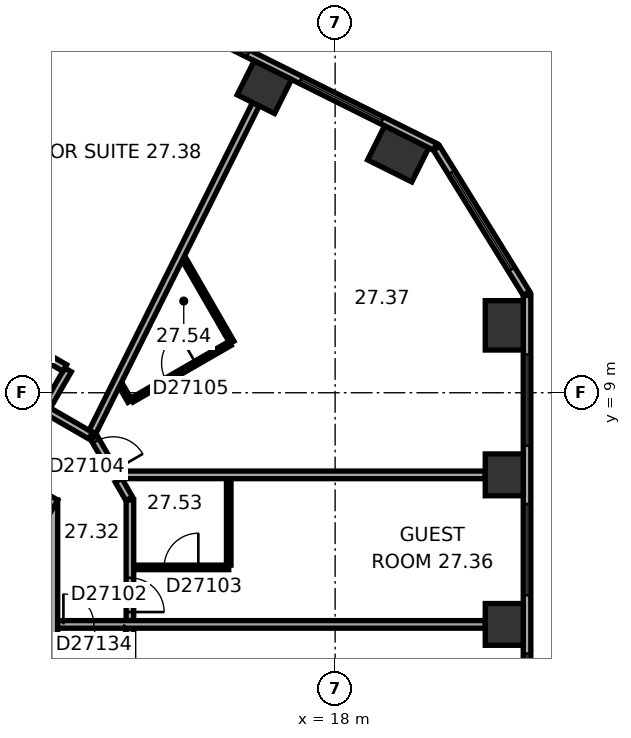
"""IFC4 building model, lengths in metres.
Left out: names, types, materials, properties, quantities, classifications, styles, units other than length and angle.
Written with IfcOpenShell. Run it as: python <this file> out.ifc"""

import sys

from ifc_helpers import new_model, si_unit, direction, frame, frame_2d, origin, origin_2d, place, context, subcontext, project, spatial, rectangle, extrude, element, fill, save


model = new_model("IFC4")
c1 = context("Model", 3, precision=1e-05, world=origin(), true_north=direction((0.0, 1.0)))
c2 = subcontext(c1, "Body", "Model", "MODEL_VIEW")
j1 = project(units=[si_unit("LENGTHUNIT", "METRE"), si_unit("PLANEANGLEUNIT", "RADIAN")], contexts=[c1])
p1 = place(None, origin())
s1 = spatial("IfcSite", under=j1, at=p1, CompositionType="ELEMENT")
p2 = place(p1, origin())
s2 = spatial("IfcBuilding", under=s1, at=p2, CompositionType="ELEMENT")
p3 = place(p2, frame((0.0, 0.0, 113.3)))
s3 = spatial("IfcBuildingStorey", under=s2, at=p3, CompositionType="ELEMENT", Elevation=113.3)
for number, where, z_axis, x_axis in (
    (1, (22.45, 2.905, 0.0), (0.0, 0.0, 1.0), (0.0, 1.0, 0.0)),
    (2, (22.45, 6.839, 0.0), (0.0, 0.0, 1.0), (0.0, 1.0, 0.0)),
):
    element("IfcColumn", number, at=place(p3, frame(where, z_axis=z_axis, x_axis=x_axis)), inside=s3, PredefinedType="COLUMN", context=c2, shape_type="SweptSolid", body=[
        extrude(rectangle(XDim=1.1, YDim=1.0, at=origin_2d()), origin(), (0.0, 0.0, 1.0), 3.3),
    ])
for number, where, z_axis, x_axis in (
    (3, (22.45, 10.774, 0.0), (0.0, 0.0, 1.0), (0.0, 1.0, 0.0)),
    (4, (19.659, 15.284, 0.0), (0.0, 0.0, 1.0), (-0.895, 0.446, 0.0)),
):
    element("IfcColumn", number, at=place(p3, frame(where, z_axis=z_axis, x_axis=x_axis)), inside=s3, PredefinedType="COLUMN", context=c2, shape_type="SweptSolid", body=[
        extrude(rectangle(XDim=1.3, YDim=1.0, at=origin_2d()), origin(), (0.0, 0.0, 1.0), 3.3),
    ])
p4 = place(p3, frame((16.138, 17.04, 0.0), z_axis=(0.0, 0.0, 1.0), x_axis=(-0.894934361602, 0.44619781311, 0.0)))
e5 = element("IfcColumn", 5, at=p4, inside=s3, PredefinedType="COLUMN", context=c2, shape_type="SweptSolid", body=[
    extrude(rectangle(XDim=1.1, YDim=1.0, at=origin_2d()), origin(), (0.0, 0.0, 1.0), 3.3),
])
p5 = place(p3, frame((10.1, -6.177, 0.0), z_axis=(0.0, 0.0, 1.0), x_axis=(0.0, 1.0, 0.0)))
e6 = element("IfcWall", 6, at=p5, inside=s3, PredefinedType="SHEAR", context=c2, shape_type="SweptSolid", body=[
    extrude(rectangle(XDim=12.355, YDim=1.2, at=frame_2d((6.177, 0.0))), origin(), (0.0, 0.0, 1.0), 3.3),
])
p6 = place(p5, frame((6.378, 0.0, 0.0)))
e7 = element("IfcOpeningElement", 7, at=p6, cuts=e6, PredefinedType="OPENING", context=c2, shape_type="SweptSolid", body=[
    extrude(rectangle(XDim=1.5, YDim=2.1, at=frame_2d((0.75, 1.05))), frame((0.0, 0.61, 0.0), z_axis=(0.0, -1.0, 0.0), x_axis=(1.0, 0.0, 0.0)), (0.0, 0.0, 1.0), 1.22),
])
p7 = place(p5, frame((1.828, 0.0, 0.0)))
e8 = element("IfcOpeningElement", 8, at=p7, cuts=e6, PredefinedType="OPENING", context=c2, shape_type="SweptSolid", body=[
    extrude(rectangle(XDim=1.1, YDim=2.1, at=frame_2d((0.55, 1.05))), frame((0.0, 0.61, 0.0), z_axis=(0.0, -1.0, 0.0), x_axis=(1.0, 0.0, 0.0)), (0.0, 0.0, 1.0), 1.22),
])
p8 = place(p5, frame((4.427, 0.0, 0.0)))
e9 = element("IfcOpeningElement", 9, at=p8, cuts=e6, PredefinedType="OPENING", context=c2, shape_type="SweptSolid", body=[
    extrude(rectangle(XDim=1.1, YDim=2.1, at=frame_2d((0.55, 1.05))), frame((0.0, 0.61, 0.0), z_axis=(0.0, -1.0, 0.0), x_axis=(1.0, 0.0, 0.0)), (0.0, 0.0, 1.0), 1.22),
])
p9 = place(p3, frame((10.4, 5.658, 0.0), z_axis=(0.0, 0.0, 1.0), x_axis=(-0.866021384402, 0.500006961711, 0.0)))
e10 = element("IfcWall", 10, at=p9, inside=s3, PredefinedType="SHEAR", context=c2, shape_type="SweptSolid", body=[
    extrude(rectangle(XDim=12.355, YDim=1.2, at=frame_2d((6.178, 0.0))), origin(), (0.0, 0.0, 1.0), 3.3),
])
p10 = place(p9, frame((2.728, 0.0, 0.0)))
e11 = element("IfcOpeningElement", 11, at=p10, cuts=e10, PredefinedType="OPENING", context=c2, shape_type="SweptSolid", body=[
    extrude(rectangle(XDim=1.1, YDim=2.1, at=frame_2d((0.55, 1.05))), frame((0.0, 0.61, 0.0), z_axis=(0.0, -1.0, 0.0), x_axis=(1.0, 0.0, 0.0)), (0.0, 0.0, 1.0), 1.22),
])
p11 = place(p9, frame((5.328, 0.0, 0.0)))
e12 = element("IfcOpeningElement", 12, at=p11, cuts=e10, PredefinedType="OPENING", context=c2, shape_type="SweptSolid", body=[
    extrude(rectangle(XDim=1.1, YDim=2.1, at=frame_2d((0.55, 1.05))), frame((0.0, 0.61, 0.0), z_axis=(0.0, -1.0, 0.0), x_axis=(1.0, 0.0, 0.0)), (0.0, 0.0, 1.0), 1.22),
])
p12 = place(p9, frame((7.928, 0.0, 0.0)))
e13 = element("IfcOpeningElement", 13, at=p12, cuts=e10, PredefinedType="OPENING", context=c2, shape_type="SweptSolid", body=[
    extrude(rectangle(XDim=1.1, YDim=2.1, at=frame_2d((0.55, 1.05))), frame((0.0, 0.61, 0.0), z_axis=(0.0, -1.0, 0.0), x_axis=(1.0, 0.0, 0.0)), (0.0, 0.0, 1.0), 1.22),
])
p13 = place(p3, frame((23.05, -9.687, 0.0), z_axis=(0.0, 0.0, 1.0), x_axis=(0.0, 1.0, 0.0)))
e14 = element("IfcWall", 14, at=p13, inside=s3, PredefinedType="STANDARD", context=c2, shape_type="SweptSolid", body=[
    extrude(rectangle(XDim=21.246, YDim=0.2, at=frame_2d((10.623, 0.0))), origin(), (0.0, 0.0, 1.0), 3.3),
])
p14 = place(p13, frame((1.555, 0.0, 0.8)))
e15 = element("IfcOpeningElement", 15, at=p14, cuts=e14, PredefinedType="OPENING", context=c2, shape_type="SweptSolid", body=[
    extrude(rectangle(XDim=2.4, YDim=1.7, at=frame_2d((1.2, 0.85))), frame((0.0, 0.11, 0.0), z_axis=(0.0, -1.0, 0.0), x_axis=(1.0, 0.0, 0.0)), (0.0, 0.0, 1.0), 0.22),
])
p15 = place(p13, frame((5.489, 0.0, 0.8)))
e16 = element("IfcOpeningElement", 16, at=p15, cuts=e14, PredefinedType="OPENING", context=c2, shape_type="SweptSolid", body=[
    extrude(rectangle(XDim=2.4, YDim=1.7, at=frame_2d((1.2, 0.85))), frame((0.0, 0.11, 0.0), z_axis=(0.0, -1.0, 0.0), x_axis=(1.0, 0.0, 0.0)), (0.0, 0.0, 1.0), 0.22),
])
p16 = place(p13, frame((9.424, 0.0, 0.8)))
e17 = element("IfcOpeningElement", 17, at=p16, cuts=e14, PredefinedType="OPENING", context=c2, shape_type="SweptSolid", body=[
    extrude(rectangle(XDim=2.4, YDim=1.7, at=frame_2d((1.2, 0.85))), frame((0.0, 0.11, 0.0), z_axis=(0.0, -1.0, 0.0), x_axis=(1.0, 0.0, 0.0)), (0.0, 0.0, 1.0), 0.22),
])
p17 = place(p13, frame((13.358, 0.0, 0.8)))
e18 = element("IfcOpeningElement", 18, at=p17, cuts=e14, PredefinedType="OPENING", context=c2, shape_type="SweptSolid", body=[
    extrude(rectangle(XDim=2.4, YDim=1.7, at=frame_2d((1.2, 0.85))), frame((0.0, 0.11, 0.0), z_axis=(0.0, -1.0, 0.0), x_axis=(1.0, 0.0, 0.0)), (0.0, 0.0, 1.0), 0.22),
])
p18 = place(p13, frame((17.293, 0.0, 0.8)))
e19 = element("IfcOpeningElement", 19, at=p18, cuts=e14, PredefinedType="OPENING", context=c2, shape_type="SweptSolid", body=[
    extrude(rectangle(XDim=2.4, YDim=1.7, at=frame_2d((1.2, 0.85))), frame((0.0, 0.11, 0.0), z_axis=(0.0, -1.0, 0.0), x_axis=(1.0, 0.0, 0.0)), (0.0, 0.0, 1.0), 0.22),
])
p19 = place(p3, frame((23.035, 11.612, 0.0), z_axis=(0.0, 0.0, 1.0), x_axis=(-0.526160091227, 0.850385535155, 0.0)))
e20 = element("IfcWall", 20, at=p19, inside=s3, PredefinedType="STANDARD", context=c2, shape_type="SweptSolid", body=[
    extrude(rectangle(XDim=4.494, YDim=0.2, at=frame_2d((2.247, 0.0))), origin(), (0.0, 0.0, 1.0), 3.3),
])
p20 = place(p19, frame((0.747, 0.0, 0.8)))
e21 = element("IfcOpeningElement", 21, at=p20, cuts=e20, PredefinedType="OPENING", context=c2, shape_type="SweptSolid", body=[
    extrude(rectangle(XDim=3.0, YDim=1.7, at=frame_2d((1.5, 0.85))), frame((0.0, 0.11, 0.0), z_axis=(0.0, -1.0, 0.0), x_axis=(1.0, 0.0, 0.0)), (0.0, 0.0, 1.0), 0.22),
])
p21 = place(p3, frame((20.63, 15.47, 0.0), z_axis=(0.0, 0.0, 1.0), x_axis=(-0.894934518609, 0.446197498203, 0.0)))
e22 = element("IfcWall", 22, at=p21, inside=s3, PredefinedType="STANDARD", context=c2, shape_type="SweptSolid", body=[
    extrude(rectangle(XDim=21.246, YDim=0.2, at=frame_2d((10.623, 0.0))), origin(), (0.0, 0.0, 1.0), 3.3),
])
p22 = place(p21, frame((1.553, 0.0, 0.8)))
e23 = element("IfcOpeningElement", 23, at=p22, cuts=e22, PredefinedType="OPENING", context=c2, shape_type="SweptSolid", body=[
    extrude(rectangle(XDim=2.4, YDim=1.7, at=frame_2d((1.2, 0.85))), frame((0.0, 0.11, 0.0), z_axis=(0.0, -1.0, 0.0), x_axis=(1.0, 0.0, 0.0)), (0.0, 0.0, 1.0), 0.22),
])
p23 = place(p21, frame((5.488, 0.0, 0.8)))
e24 = element("IfcOpeningElement", 24, at=p23, cuts=e22, PredefinedType="OPENING", context=c2, shape_type="SweptSolid", body=[
    extrude(rectangle(XDim=2.4, YDim=1.7, at=frame_2d((1.2, 0.85))), frame((0.0, 0.11, 0.0), z_axis=(0.0, -1.0, 0.0), x_axis=(1.0, 0.0, 0.0)), (0.0, 0.0, 1.0), 0.22),
])
p24 = place(p21, frame((9.422, 0.0, 0.8)))
e25 = element("IfcOpeningElement", 25, at=p24, cuts=e22, PredefinedType="OPENING", context=c2, shape_type="SweptSolid", body=[
    extrude(rectangle(XDim=2.4, YDim=1.7, at=frame_2d((1.2, 0.85))), frame((0.0, 0.11, 0.0), z_axis=(0.0, -1.0, 0.0), x_axis=(1.0, 0.0, 0.0)), (0.0, 0.0, 1.0), 0.22),
])
p25 = place(p21, frame((13.357, 0.0, 0.8)))
e26 = element("IfcOpeningElement", 26, at=p25, cuts=e22, PredefinedType="OPENING", context=c2, shape_type="SweptSolid", body=[
    extrude(rectangle(XDim=2.4, YDim=1.7, at=frame_2d((1.2, 0.85))), frame((0.0, 0.11, 0.0), z_axis=(0.0, -1.0, 0.0), x_axis=(1.0, 0.0, 0.0)), (0.0, 0.0, 1.0), 0.22),
])
p26 = place(p21, frame((17.292, 0.0, 0.8)))
e27 = element("IfcOpeningElement", 27, at=p26, cuts=e22, PredefinedType="OPENING", context=c2, shape_type="SweptSolid", body=[
    extrude(rectangle(XDim=2.4, YDim=1.7, at=frame_2d((1.2, 0.85))), frame((0.0, 0.11, 0.0), z_axis=(0.0, -1.0, 0.0), x_axis=(1.0, 0.0, 0.0)), (0.0, 0.0, 1.0), 0.22),
])
p27 = place(p3, frame((10.371, 8.561, 0.0), z_axis=(0.0, 0.0, 1.0), x_axis=(0.499986357472, 0.866033280158, 0.0)))
e28 = element("IfcWall", 28, at=p27, inside=s3, PredefinedType="PARTITIONING", context=c2, shape_type="SweptSolid", body=[
    extrude(rectangle(XDim=1.201, YDim=0.2, at=frame_2d((0.601, 0.0))), origin(), (0.0, 0.0, 1.0), 3.05),
])
p28 = place(p3, frame((10.885, 9.652, 0.0), z_axis=(0.0, 0.0, 1.0), x_axis=(-0.866033868542, 0.499985338323, 0.0)))
e29 = element("IfcWall", 29, at=p28, inside=s3, PredefinedType="PARTITIONING", context=c2, shape_type="SweptSolid", body=[
    extrude(rectangle(XDim=8.602, YDim=0.2, at=frame_2d((4.301, 0.0))), origin(), (0.0, 0.0, 1.0), 3.05),
])
p29 = place(p28, frame((1.464, 0.0, 0.0)))
e30 = element("IfcOpeningElement", 30, at=p29, cuts=e29, PredefinedType="OPENING", context=c2, shape_type="SweptSolid", body=[
    extrude(rectangle(XDim=0.9, YDim=2.1, at=frame_2d((0.45, 1.05))), frame((0.0, 0.11, 0.0), z_axis=(0.0, -1.0, 0.0), x_axis=(1.0, 0.0, 0.0)), (0.0, 0.0, 1.0), 0.22),
])
p30 = place(p28, frame((7.09, 0.0, 0.0)))
e31 = element("IfcOpeningElement", 31, at=p30, cuts=e29, PredefinedType="OPENING", context=c2, shape_type="SweptSolid", body=[
    extrude(rectangle(XDim=0.9, YDim=2.1, at=frame_2d((0.45, 1.05))), frame((0.0, 0.11, 0.0), z_axis=(0.0, -1.0, 0.0), x_axis=(1.0, 0.0, 0.0)), (0.0, 0.0, 1.0), 0.22),
])
p31 = place(p3, frame((11.566, 7.871, 0.0), z_axis=(0.0, 0.0, 1.0), x_axis=(-0.866004557827, 0.500036104519, 0.0)))
e32 = element("IfcWall", 32, at=p31, inside=s3, PredefinedType="PARTITIONING", context=c2, shape_type="SweptSolid", body=[
    extrude(rectangle(XDim=1.28, YDim=0.2, at=frame_2d((0.64, 0.0))), origin(), (0.0, 0.0, 1.0), 3.05),
])
p32 = place(p3, frame((12.218, 6.839, 0.0), z_axis=(0.0, 0.0, 1.0), x_axis=(-0.500044870432, 0.865999496279, 0.0)))
e33 = element("IfcWall", 33, at=p32, inside=s3, PredefinedType="PARTITIONING", context=c2, shape_type="SweptSolid", body=[
    extrude(rectangle(XDim=1.136, YDim=0.2, at=frame_2d((0.568, 0.0))), origin(), (0.0, 0.0, 1.0), 3.05),
])
p33 = place(p32, frame((0.118, 0.0, 0.0)))
e34 = element("IfcOpeningElement", 34, at=p33, cuts=e33, PredefinedType="OPENING", context=c2, shape_type="SweptSolid", body=[
    extrude(rectangle(XDim=0.9, YDim=2.1, at=frame_2d((0.45, 1.05))), frame((0.0, 0.11, 0.0), z_axis=(0.0, -1.0, 0.0), x_axis=(1.0, 0.0, 0.0)), (0.0, 0.0, 1.0), 0.22),
])
p34 = place(p3, frame((12.58, 6.212, 0.0), z_axis=(0.0, 0.0, 1.0), x_axis=(-0.499936258447, 0.86606220186, 0.0)))
e35 = element("IfcWall", 35, at=p34, inside=s3, PredefinedType="PARTITIONING", context=c2, shape_type="SweptSolid", body=[
    extrude(rectangle(XDim=0.56, YDim=0.2, at=frame_2d((0.28, 0.0))), origin(), (0.0, 0.0, 1.0), 3.05),
])
p35 = place(p3, frame((12.6, 0.201, 0.0), z_axis=(0.0, 0.0, 1.0), x_axis=(0.0, 1.0, 0.0)))
e36 = element("IfcWall", 36, at=p35, inside=s3, PredefinedType="PARTITIONING", context=c2, shape_type="SweptSolid", body=[
    extrude(rectangle(XDim=2.604, YDim=0.2, at=frame_2d((1.302, 0.0))), origin(), (0.0, 0.0, 1.0), 3.05),
])
p36 = place(p3, frame((12.6, 3.004, 0.0), z_axis=(0.0, 0.0, 1.0), x_axis=(0.0, 1.0, 0.0)))
e37 = element("IfcWall", 37, at=p36, inside=s3, PredefinedType="PARTITIONING", context=c2, shape_type="SweptSolid", body=[
    extrude(rectangle(XDim=3.173, YDim=0.2, at=frame_2d((1.586, 0.0))), origin(), (0.0, 0.0, 1.0), 3.05),
])
p37 = place(p36, frame((0.225, 0.0, 0.0)))
e38 = element("IfcOpeningElement", 38, at=p37, cuts=e37, PredefinedType="OPENING", context=c2, shape_type="SweptSolid", body=[
    extrude(rectangle(XDim=0.9, YDim=2.1, at=frame_2d((0.45, 1.05))), frame((0.0, 0.11, 0.0), z_axis=(0.0, -1.0, 0.0), x_axis=(1.0, 0.0, 0.0)), (0.0, 0.0, 1.0), 0.22),
])
p38 = place(p3, frame((12.601, 8.776, 0.0), z_axis=(0.0, 0.0, 1.0), x_axis=(-0.500166486798, 0.865929261247, 0.0)))
e39 = element("IfcWall", 39, at=p38, inside=s3, PredefinedType="PARTITIONING", context=c2, shape_type="SweptSolid", body=[
    extrude(rectangle(XDim=0.476, YDim=0.12, at=frame_2d((0.238, 0.0))), origin(), (0.0, 0.0, 1.0), 3.05),
])
p39 = place(p3, frame((14.022, 12.515, 0.0), z_axis=(0.0, 0.0, 1.0), x_axis=(0.499962146402, -0.866047257466, 0.0)))
e40 = element("IfcWall", 40, at=p39, inside=s3, PredefinedType="PARTITIONING", context=c2, shape_type="SweptSolid", body=[
    extrude(rectangle(XDim=2.528, YDim=0.12, at=frame_2d((1.264, 0.0))), origin(), (0.0, 0.0, 1.0), 3.05),
])
p40 = place(p3, frame((15.2, 4.405, 0.0), z_axis=(0.0, 0.0, 1.0), x_axis=(-1.0, 0.0, 0.0)))
e41 = element("IfcWall", 41, at=p40, inside=s3, PredefinedType="PARTITIONING", context=c2, shape_type="SweptSolid", body=[
    extrude(rectangle(XDim=2.5, YDim=0.12, at=frame_2d((1.25, 0.0))), origin(), (0.0, 0.0, 1.0), 3.05),
])
p41 = place(p40, frame((0.8, 0.0, 0.0)))
e42 = element("IfcOpeningElement", 42, at=p41, cuts=e41, PredefinedType="OPENING", context=c2, shape_type="SweptSolid", body=[
    extrude(rectangle(XDim=0.9, YDim=2.1, at=frame_2d((0.45, 1.05))), frame((0.0, 0.07, 0.0), z_axis=(0.0, -1.0, 0.0), x_axis=(1.0, 0.0, 0.0)), (0.0, 0.0, 1.0), 0.14),
])
p42 = place(p3, frame((15.2, 6.739, 0.0), z_axis=(0.0, 0.0, 1.0), x_axis=(0.0, -1.0, 0.0)))
e43 = element("IfcWall", 43, at=p42, inside=s3, PredefinedType="PARTITIONING", context=c2, shape_type="SweptSolid", body=[
    extrude(rectangle(XDim=2.274, YDim=0.12, at=frame_2d((1.137, 0.0))), origin(), (0.0, 0.0, 1.0), 3.05),
])
p43 = place(p3, frame((15.233, 10.296, 0.0), z_axis=(0.0, 0.0, 1.0), x_axis=(-0.866010940986, -0.500025049464, 0.0)))
e44 = element("IfcWall", 44, at=p43, inside=s3, PredefinedType="PARTITIONING", context=c2, shape_type="SweptSolid", body=[
    extrude(rectangle(XDim=2.98, YDim=0.12, at=frame_2d((1.49, 0.0))), origin(), (0.0, 0.0, 1.0), 3.05),
])
p44 = place(p43, frame((1.04, 0.0, 0.0)))
e45 = element("IfcOpeningElement", 45, at=p44, cuts=e44, PredefinedType="OPENING", context=c2, shape_type="SweptSolid", body=[
    extrude(rectangle(XDim=0.9, YDim=2.1, at=frame_2d((0.45, 1.05))), frame((0.0, 0.07, 0.0), z_axis=(0.0, -1.0, 0.0), x_axis=(1.0, 0.0, 0.0)), (0.0, 0.0, 1.0), 0.14),
])
p45 = place(p3, frame((15.915, 16.592, 0.0), z_axis=(0.0, 0.0, 1.0), x_axis=(-0.446199736347, -0.894933402709, 0.0)))
e46 = element("IfcWall", 46, at=p45, inside=s3, PredefinedType="PARTITIONING", context=c2, shape_type="SweptSolid", body=[
    extrude(rectangle(XDim=9.635, YDim=0.2, at=frame_2d((4.817, 0.0))), origin(), (0.0, 0.0, 1.0), 3.05),
])
p46 = place(p3, frame((21.95, 2.905, 0.0), z_axis=(0.0, 0.0, 1.0), x_axis=(-1.0, 0.0, 0.0)))
e47 = element("IfcWall", 47, at=p46, inside=s3, PredefinedType="PARTITIONING", context=c2, shape_type="SweptSolid", body=[
    extrude(rectangle(XDim=11.25, YDim=0.2, at=frame_2d((5.625, 0.0))), origin(), (0.0, 0.0, 1.0), 3.05),
])
p47 = place(p46, frame((9.5, 0.0, 0.0)))
e48 = element("IfcOpeningElement", 48, at=p47, cuts=e47, PredefinedType="OPENING", context=c2, shape_type="SweptSolid", body=[
    extrude(rectangle(XDim=1.6, YDim=2.1, at=frame_2d((0.8, 1.05))), frame((0.0, 0.11, 0.0), z_axis=(0.0, -1.0, 0.0), x_axis=(1.0, 0.0, 0.0)), (0.0, 0.0, 1.0), 0.22),
])
p48 = place(p3, frame((21.95, 6.839, 0.0), z_axis=(0.0, 0.0, 1.0), x_axis=(-1.0, 0.0, 0.0)))
e49 = element("IfcWall", 49, at=p48, inside=s3, PredefinedType="PARTITIONING", context=c2, shape_type="SweptSolid", body=[
    extrude(rectangle(XDim=9.65, YDim=0.2, at=frame_2d((4.825, 0.0))), origin(), (0.0, 0.0, 1.0), 3.05),
])
p49 = place(p16, origin())
e50 = element("IfcWindow", 50, at=p49, inside=s3, PartitioningType="SINGLE_PANEL", PredefinedType="WINDOW", context=c2, shape_type="SweptSolid", body=[
    extrude(rectangle(XDim=2.4, YDim=1.7, at=frame_2d((1.2, 0.85))), frame((0.0, 0.03, 0.0), z_axis=(0.0, -1.0, 0.0), x_axis=(1.0, 0.0, 0.0)), (0.0, 0.0, 1.0), 0.06),
])
fill(e17, e50)
p50 = place(p17, origin())
e51 = element("IfcWindow", 51, at=p50, inside=s3, PartitioningType="SINGLE_PANEL", PredefinedType="WINDOW", context=c2, shape_type="SweptSolid", body=[
    extrude(rectangle(XDim=2.4, YDim=1.7, at=frame_2d((1.2, 0.85))), frame((0.0, 0.03, 0.0), z_axis=(0.0, -1.0, 0.0), x_axis=(1.0, 0.0, 0.0)), (0.0, 0.0, 1.0), 0.06),
])
fill(e18, e51)
p51 = place(p18, origin())
e52 = element("IfcWindow", 52, at=p51, inside=s3, PartitioningType="SINGLE_PANEL", PredefinedType="WINDOW", context=c2, shape_type="SweptSolid", body=[
    extrude(rectangle(XDim=2.4, YDim=1.7, at=frame_2d((1.2, 0.85))), frame((0.0, 0.03, 0.0), z_axis=(0.0, -1.0, 0.0), x_axis=(1.0, 0.0, 0.0)), (0.0, 0.0, 1.0), 0.06),
])
fill(e19, e52)
p52 = place(p20, origin())
e53 = element("IfcWindow", 53, at=p52, inside=s3, PartitioningType="SINGLE_PANEL", PredefinedType="WINDOW", context=c2, shape_type="SweptSolid", body=[
    extrude(rectangle(XDim=3.0, YDim=1.7, at=frame_2d((1.5, 0.85))), frame((0.0, 0.03, 0.0), z_axis=(0.0, -1.0, 0.0), x_axis=(1.0, 0.0, 0.0)), (0.0, 0.0, 1.0), 0.06),
])
fill(e21, e53)
p53 = place(p22, origin())
e54 = element("IfcWindow", 54, at=p53, inside=s3, PartitioningType="SINGLE_PANEL", PredefinedType="WINDOW", context=c2, shape_type="SweptSolid", body=[
    extrude(rectangle(XDim=2.4, YDim=1.7, at=frame_2d((1.2, 0.85))), frame((0.0, 0.03, 0.0), z_axis=(0.0, -1.0, 0.0), x_axis=(1.0, 0.0, 0.0)), (0.0, 0.0, 1.0), 0.06),
])
fill(e23, e54)
p54 = place(p23, origin())
e55 = element("IfcWindow", 55, at=p54, inside=s3, PartitioningType="SINGLE_PANEL", PredefinedType="WINDOW", context=c2, shape_type="SweptSolid", body=[
    extrude(rectangle(XDim=2.4, YDim=1.7, at=frame_2d((1.2, 0.85))), frame((0.0, 0.03, 0.0), z_axis=(0.0, -1.0, 0.0), x_axis=(1.0, 0.0, 0.0)), (0.0, 0.0, 1.0), 0.06),
])
fill(e24, e55)
p55 = place(p37, origin())
e56 = element("IfcDoor", 56, at=p55, inside=s3, OperationType="SINGLE_SWING_LEFT", PredefinedType="DOOR", context=c2, shape_type="SweptSolid", body=[
    extrude(rectangle(XDim=0.9, YDim=2.1, at=frame_2d((0.45, 1.05))), frame((0.0, 0.025, 0.0), z_axis=(0.0, -1.0, 0.0), x_axis=(1.0, 0.0, 0.0)), (0.0, 0.0, 1.0), 0.05),
])
fill(e38, e56)
p56 = place(p41, origin())
e57 = element("IfcDoor", 57, at=p56, inside=s3, OperationType="SINGLE_SWING_LEFT", PredefinedType="DOOR", context=c2, shape_type="SweptSolid", body=[
    extrude(rectangle(XDim=0.9, YDim=2.1, at=frame_2d((0.45, 1.05))), frame((0.0, 0.025, 0.0), z_axis=(0.0, -1.0, 0.0), x_axis=(1.0, 0.0, 0.0)), (0.0, 0.0, 1.0), 0.05),
])
fill(e42, e57)
p57 = place(p33, origin())
e58 = element("IfcDoor", 58, at=p57, inside=s3, OperationType="SINGLE_SWING_LEFT", PredefinedType="DOOR", context=c2, shape_type="SweptSolid", body=[
    extrude(rectangle(XDim=0.9, YDim=2.1, at=frame_2d((0.45, 1.05))), frame((0.0, 0.025, 0.0), z_axis=(0.0, -1.0, 0.0), x_axis=(1.0, 0.0, 0.0)), (0.0, 0.0, 1.0), 0.05),
])
fill(e34, e58)
p58 = place(p44, origin())
e59 = element("IfcDoor", 59, at=p58, inside=s3, OperationType="SINGLE_SWING_LEFT", PredefinedType="DOOR", context=c2, shape_type="SweptSolid", body=[
    extrude(rectangle(XDim=0.9, YDim=2.1, at=frame_2d((0.45, 1.05))), frame((0.0, 0.025, 0.0), z_axis=(0.0, -1.0, 0.0), x_axis=(1.0, 0.0, 0.0)), (0.0, 0.0, 1.0), 0.05),
])
fill(e45, e59)
p59 = place(p47, origin())
e60 = element("IfcDoor", 60, at=p59, inside=s3, OperationType="DOUBLE_DOOR_SINGLE_SWING", PredefinedType="DOOR", context=c2, shape_type="SweptSolid", body=[
    extrude(rectangle(XDim=1.6, YDim=2.1, at=frame_2d((0.8, 1.05))), frame((0.0, 0.025, 0.0), z_axis=(0.0, -1.0, 0.0), x_axis=(1.0, 0.0, 0.0)), (0.0, 0.0, 1.0), 0.05),
])
fill(e48, e60)
save(model, sys.argv[1])
